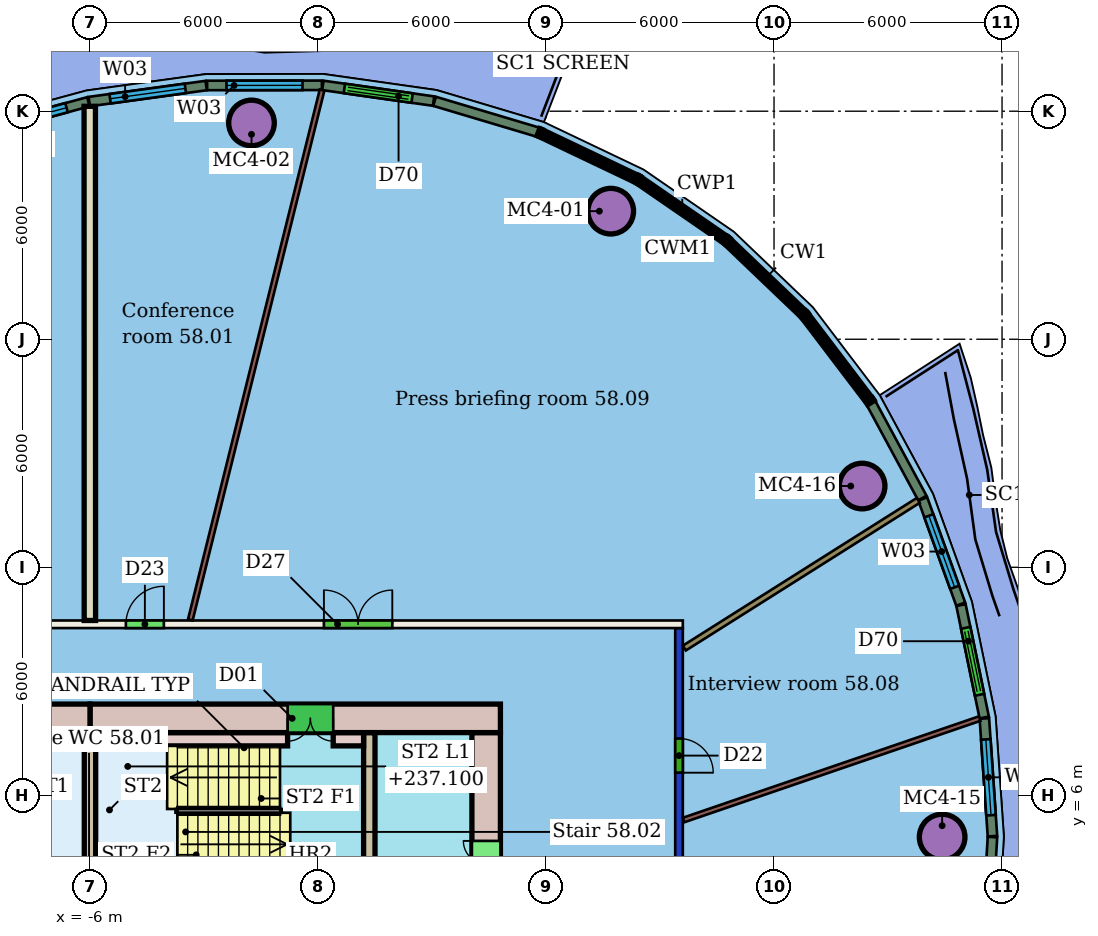
"""IFC4 building model, lengths in metres.
Left out: names, types, materials, properties, quantities, classifications, styles, units other than length and angle.
Written with IfcOpenShell. Run it as: python <this file> out.ifc"""

import sys

from ifc_helpers import new_model, si_unit, direction, frame, frame_2d, origin, origin_2d, place, context, subcontext, project, spatial, rectangle, hollow_circle, extrude, element, fill, save


model = new_model("IFC4")
c1 = context("Model", 3, precision=1e-05, world=origin(), true_north=direction((0.0, 1.0)))
c2 = subcontext(c1, "Body", "Model", "MODEL_VIEW")
j1 = project(units=[si_unit("LENGTHUNIT", "METRE"), si_unit("PLANEANGLEUNIT", "RADIAN")], contexts=[c1])
p1 = place(None, origin())
s1 = spatial("IfcSite", under=j1, at=p1, CompositionType="ELEMENT")
p2 = place(p1, origin())
s2 = spatial("IfcBuilding", under=s1, at=p2, CompositionType="ELEMENT")
p3 = place(p2, frame((0.0, 0.0, 235.3)))
s3 = spatial("IfcBuildingStorey", under=s2, at=p3, CompositionType="ELEMENT", Elevation=235.3)
for number, where, z_axis, x_axis in (
    (1, (7.704, 21.37, 0.0), (0.0, 0.0, 1.0), (1.0, 0.0, 0.0)),
    (2, (-1.75, 23.691, 0.0), (0.0, 0.0, 1.0), (1.0, 0.0, 0.0)),
    (3, (16.424, 4.901, 0.0), (0.0, 0.0, 1.0), (1.0, 0.0, 0.0)),
    (4, (14.318, 14.137, 0.0), (0.0, 0.0, 1.0), (1.0, 0.0, 0.0)),
):
    element("IfcColumn", number, at=place(p3, frame(where, z_axis=z_axis, x_axis=x_axis)), inside=s3, PredefinedType="COLUMN", context=c2, shape_type="SweptSolid", body=[
        extrude(hollow_circle(Radius=0.6, WallThickness=0.045, at=origin_2d()), origin(), (0.0, 0.0, 1.0), 3.45),
    ])
p4 = place(p3, frame((-21.6, 10.5, 0.0), z_axis=(0.0, 0.0, 1.0), x_axis=(1.0, 0.0, 0.0)))
e5 = element("IfcWall", 5, at=p4, inside=s3, PredefinedType="PARTITIONING", context=c2, shape_type="SweptSolid", body=[
    extrude(rectangle(XDim=31.2, YDim=0.2, at=frame_2d((15.6, 0.0))), origin(), (0.0, 0.0, 1.0), 3.45),
])
p5 = place(p4, frame((16.544, 0.0, 0.0)))
e6 = element("IfcOpeningElement", 6, at=p5, cuts=e5, PredefinedType="OPENING", context=c2, shape_type="SweptSolid", body=[
    extrude(rectangle(XDim=1.0, YDim=2.4, at=frame_2d((0.5, 1.2))), frame((0.0, 0.11, 0.0), z_axis=(0.0, -1.0, 0.0), x_axis=(1.0, 0.0, 0.0)), (0.0, 0.0, 1.0), 0.22),
])
p6 = place(p4, frame((10.228, 0.0, 0.0)))
e7 = element("IfcOpeningElement", 7, at=p6, cuts=e5, PredefinedType="OPENING", context=c2, shape_type="SweptSolid", body=[
    extrude(rectangle(XDim=1.8, YDim=2.4, at=frame_2d((0.9, 1.2))), frame((0.0, 0.11, 0.0), z_axis=(0.0, -1.0, 0.0), x_axis=(1.0, 0.0, 0.0)), (0.0, 0.0, 1.0), 0.22),
])
p7 = place(p4, frame((21.755, 0.0, 0.0)))
e8 = element("IfcOpeningElement", 8, at=p7, cuts=e5, PredefinedType="OPENING", context=c2, shape_type="SweptSolid", body=[
    extrude(rectangle(XDim=1.8, YDim=2.4, at=frame_2d((0.9, 1.2))), frame((0.0, 0.11, 0.0), z_axis=(0.0, -1.0, 0.0), x_axis=(1.0, 0.0, 0.0)), (0.0, 0.0, 1.0), 0.22),
])
p8 = place(p3, frame((9.5, 10.4, 0.0), z_axis=(0.0, 0.0, 1.0), x_axis=(0.0, -1.0, 0.0)))
e9 = element("IfcWall", 9, at=p8, inside=s3, PredefinedType="PARTITIONING", context=c2, shape_type="SweptSolid", body=[
    extrude(rectangle(XDim=20.8, YDim=0.2, at=frame_2d((10.4, 0.0))), origin(), (0.0, 0.0, 1.0), 3.05),
])
p9 = place(p8, frame((8.162, 0.0, 0.0)))
e10 = element("IfcOpeningElement", 10, at=p9, cuts=e9, PredefinedType="OPENING", context=c2, shape_type="SweptSolid", body=[
    extrude(rectangle(XDim=1.5, YDim=2.1, at=frame_2d((0.75, 1.05))), frame((0.0, 0.11, 0.0), z_axis=(0.0, -1.0, 0.0), x_axis=(1.0, 0.0, 0.0)), (0.0, 0.0, 1.0), 0.22),
])
p10 = place(p8, frame((2.906, 0.0, 0.0)))
e11 = element("IfcOpeningElement", 11, at=p10, cuts=e9, PredefinedType="OPENING", context=c2, shape_type="SweptSolid", body=[
    extrude(rectangle(XDim=0.9, YDim=2.1, at=frame_2d((0.45, 1.05))), frame((0.0, 0.11, 0.0), z_axis=(0.0, -1.0, 0.0), x_axis=(1.0, 0.0, 0.0)), (0.0, 0.0, 1.0), 0.22),
])
p11 = place(p3, frame((0.107, 24.557, 0.0), z_axis=(0.0, 0.0, 1.0), x_axis=(-0.241331862986, -0.970442647408, 0.0)))
e12 = element("IfcWall", 12, at=p11, inside=s3, PredefinedType="PARTITIONING", context=c2, shape_type="SweptSolid", body=[
    extrude(rectangle(XDim=14.366, YDim=0.125, at=frame_2d((7.183, 0.0))), origin(), (0.0, 0.0, 1.0), 3.45),
])
p12 = place(p3, frame((-6.006, 24.129, 0.0), z_axis=(0.0, 0.0, 1.0), x_axis=(0.000252643728, -0.999999968086, 0.0)))
e13 = element("IfcWall", 13, at=p12, inside=s3, PredefinedType="PARTITIONING", context=c2, shape_type="SweptSolid", body=[
    extrude(rectangle(XDim=13.529, YDim=0.3, at=frame_2d((6.764, 0.0))), origin(), (0.0, 0.0, 1.0), 3.45),
])
p13 = place(p3, frame((17.41, 8.018, 0.0), z_axis=(0.0, 0.0, 1.0), x_axis=(-0.94604778294, -0.32402714762, 0.0)))
e14 = element("IfcWall", 14, at=p13, inside=s3, PredefinedType="PARTITIONING", context=c2, shape_type="SweptSolid", body=[
    extrude(rectangle(XDim=8.234, YDim=0.125, at=frame_2d((4.117, 0.0))), origin(), (0.0, 0.0, 1.0), 3.45),
])
p14 = place(p3, frame((15.795, 13.759, 0.0), z_axis=(0.0, 0.0, 1.0), x_axis=(-0.845590904019, -0.533831455649, 0.0)))
e15 = element("IfcWall", 15, at=p14, inside=s3, PredefinedType="PARTITIONING", context=c2, shape_type="SweptSolid", body=[
    extrude(rectangle(XDim=7.279, YDim=0.15, at=frame_2d((3.64, 0.0))), origin(), (0.0, 0.0, 1.0), 3.45),
])
p15 = place(p3, frame((5.785, 23.449, 0.0), z_axis=(0.0, 0.0, 1.0), x_axis=(-0.958235211518, 0.28598125709, 0.0)))
e16 = element("IfcWall", 16, at=p15, inside=s3, PredefinedType="SOLIDWALL", context=c2, shape_type="SweptSolid", body=[
    extrude(rectangle(XDim=2.836, YDim=0.25, at=frame_2d((1.418, 0.0))), origin(), (0.0, 0.0, 1.0), 3.1),
])
p16 = place(p3, frame((3.042, 24.266, 0.0), z_axis=(0.0, 0.0, 1.0), x_axis=(-0.990073564397, 0.140550123028, 0.0)))
e17 = element("IfcWall", 17, at=p16, inside=s3, PredefinedType="SOLIDWALL", context=c2, shape_type="SweptSolid", body=[
    extrude(rectangle(XDim=2.943, YDim=0.25, at=frame_2d((1.471, 0.0))), origin(), (0.0, 0.0, 1.0), 3.1),
])
p17 = place(p16, frame((0.571, 0.0, 0.0)))
e18 = element("IfcOpeningElement", 18, at=p17, cuts=e17, PredefinedType="OPENING", context=c2, shape_type="SweptSolid", body=[
    extrude(rectangle(XDim=1.8, YDim=2.4, at=frame_2d((0.9, 1.2))), frame((0.0, 0.135, 0.0), z_axis=(0.0, -1.0, 0.0), x_axis=(1.0, 0.0, 0.0)), (0.0, 0.0, 1.0), 0.27),
])
p18 = place(p3, frame((0.103, 24.681, 0.0), z_axis=(0.0, 0.0, 1.0), x_axis=(-0.999999163763, -0.001293241725, 0.0)))
e19 = element("IfcWall", 19, at=p18, inside=s3, PredefinedType="SOLIDWALL", context=c2, shape_type="SweptSolid", body=[
    extrude(rectangle(XDim=3.021, YDim=0.25, at=frame_2d((1.51, 0.0))), origin(), (0.0, 0.0, 1.0), 3.1),
])
p19 = place(p18, frame((0.51, 0.0, 0.9)))
e20 = element("IfcOpeningElement", 20, at=p19, cuts=e19, PredefinedType="OPENING", context=c2, shape_type="SweptSolid", body=[
    extrude(rectangle(XDim=2.0, YDim=2.1, at=frame_2d((1.0, 1.05))), frame((0.0, 0.135, 0.0), z_axis=(0.0, -1.0, 0.0), x_axis=(1.0, 0.0, 0.0)), (0.0, 0.0, 1.0), 0.27),
])
p20 = place(p3, frame((-2.943, 24.676, 0.0), z_axis=(0.0, 0.0, 1.0), x_axis=(-0.990694748904, -0.136102588123, 0.0)))
e21 = element("IfcWall", 21, at=p20, inside=s3, PredefinedType="SOLIDWALL", context=c2, shape_type="SweptSolid", body=[
    extrude(rectangle(XDim=3.105, YDim=0.25, at=frame_2d((1.552, 0.0))), origin(), (0.0, 0.0, 1.0), 3.1),
])
p21 = place(p20, frame((0.553, 0.0, 0.9)))
e22 = element("IfcOpeningElement", 22, at=p21, cuts=e21, PredefinedType="OPENING", context=c2, shape_type="SweptSolid", body=[
    extrude(rectangle(XDim=2.0, YDim=2.1, at=frame_2d((1.0, 1.05))), frame((0.0, 0.135, 0.0), z_axis=(0.0, -1.0, 0.0), x_axis=(1.0, 0.0, 0.0)), (0.0, 0.0, 1.0), 0.27),
])
p22 = place(p3, frame((-6.043, 24.248, 0.0), z_axis=(0.0, 0.0, 1.0), x_axis=(-0.965105590166, -0.261861031522, 0.0)))
e23 = element("IfcWall", 23, at=p22, inside=s3, PredefinedType="SOLIDWALL", context=c2, shape_type="SweptSolid", body=[
    extrude(rectangle(XDim=3.19, YDim=0.25, at=frame_2d((1.595, 0.0))), origin(), (0.0, 0.0, 1.0), 3.1),
])
p23 = place(p22, frame((0.595, 0.0, 0.9)))
e24 = element("IfcOpeningElement", 24, at=p23, cuts=e23, PredefinedType="OPENING", context=c2, shape_type="SweptSolid", body=[
    extrude(rectangle(XDim=2.0, YDim=2.1, at=frame_2d((1.0, 1.05))), frame((0.0, 0.135, 0.0), z_axis=(0.0, -1.0, 0.0), x_axis=(1.0, 0.0, 0.0)), (0.0, 0.0, 1.0), 0.27),
])
p24 = place(p3, frame((17.558, 1.716, 0.0), z_axis=(0.0, 0.0, 1.0), x_axis=(0.059610174745, 0.998221732416, 0.0)))
e25 = element("IfcWall", 25, at=p24, inside=s3, PredefinedType="SOLIDWALL", context=c2, shape_type="SweptSolid", body=[
    extrude(rectangle(XDim=3.19, YDim=0.25, at=frame_2d((1.595, 0.0))), origin(), (0.0, 0.0, 1.0), 3.1),
])
p25 = place(p24, frame((0.595, 0.0, 0.9)))
e26 = element("IfcOpeningElement", 26, at=p25, cuts=e25, PredefinedType="OPENING", context=c2, shape_type="SweptSolid", body=[
    extrude(rectangle(XDim=2.0, YDim=2.1, at=frame_2d((1.0, 1.05))), frame((0.0, 0.135, 0.0), z_axis=(0.0, -1.0, 0.0), x_axis=(1.0, 0.0, 0.0)), (0.0, 0.0, 1.0), 0.27),
])
p26 = place(p3, frame((17.748, 4.924, 0.0), z_axis=(0.0, 0.0, 1.0), x_axis=(-0.068637495047, 0.997641666268, 0.0)))
e27 = element("IfcWall", 27, at=p26, inside=s3, PredefinedType="SOLIDWALL", context=c2, shape_type="SweptSolid", body=[
    extrude(rectangle(XDim=3.105, YDim=0.25, at=frame_2d((1.553, 0.0))), origin(), (0.0, 0.0, 1.0), 3.1),
])
p27 = place(p26, frame((0.553, 0.0, 0.9)))
e28 = element("IfcOpeningElement", 28, at=p27, cuts=e27, PredefinedType="OPENING", context=c2, shape_type="SweptSolid", body=[
    extrude(rectangle(XDim=2.0, YDim=2.1, at=frame_2d((1.0, 1.05))), frame((0.0, 0.135, 0.0), z_axis=(0.0, -1.0, 0.0), x_axis=(1.0, 0.0, 0.0)), (0.0, 0.0, 1.0), 0.27),
])
p28 = place(p3, frame((17.531, 8.047, 0.0), z_axis=(0.0, 0.0, 1.0), x_axis=(-0.202546805283, 0.979272582925, 0.0)))
e29 = element("IfcWall", 29, at=p28, inside=s3, PredefinedType="SOLIDWALL", context=c2, shape_type="SweptSolid", body=[
    extrude(rectangle(XDim=3.021, YDim=0.25, at=frame_2d((1.51, 0.0))), origin(), (0.0, 0.0, 1.0), 3.1),
])
p29 = place(p28, frame((0.61, 0.0, 0.0)))
e30 = element("IfcOpeningElement", 30, at=p29, cuts=e29, PredefinedType="OPENING", context=c2, shape_type="SweptSolid", body=[
    extrude(rectangle(XDim=1.8, YDim=2.4, at=frame_2d((0.9, 1.2))), frame((0.0, 0.135, 0.0), z_axis=(0.0, -1.0, 0.0), x_axis=(1.0, 0.0, 0.0)), (0.0, 0.0, 1.0), 0.27),
])
p30 = place(p3, frame((16.913, 11.03, 0.0), z_axis=(0.0, 0.0, 1.0), x_axis=(-0.339430375323, 0.940631181871, 0.0)))
e31 = element("IfcWall", 31, at=p30, inside=s3, PredefinedType="SOLIDWALL", context=c2, shape_type="SweptSolid", body=[
    extrude(rectangle(XDim=2.943, YDim=0.25, at=frame_2d((1.471, 0.0))), origin(), (0.0, 0.0, 1.0), 3.1),
])
p31 = place(p30, frame((0.471, 0.0, 0.9)))
e32 = element("IfcOpeningElement", 32, at=p31, cuts=e31, PredefinedType="OPENING", context=c2, shape_type="SweptSolid", body=[
    extrude(rectangle(XDim=2.0, YDim=2.1, at=frame_2d((1.0, 1.05))), frame((0.0, 0.135, 0.0), z_axis=(0.0, -1.0, 0.0), x_axis=(1.0, 0.0, 0.0)), (0.0, 0.0, 1.0), 0.27),
])
p32 = place(p3, frame((15.903, 13.822, 0.0), z_axis=(0.0, 0.0, 1.0), x_axis=(-0.475295544149, 0.879826201992, 0.0)))
e33 = element("IfcWall", 33, at=p32, inside=s3, PredefinedType="SOLIDWALL", context=c2, shape_type="SweptSolid", body=[
    extrude(rectangle(XDim=2.836, YDim=0.25, at=frame_2d((1.418, 0.0))), origin(), (0.0, 0.0, 1.0), 3.1),
])
p33 = place(p3, frame((4.8, 8.025, 0.0), z_axis=(0.0, 0.0, 1.0), x_axis=(-1.0, 0.0, 0.0)))
e34 = element("IfcWall", 34, at=p33, inside=s3, PredefinedType="SHEAR", context=c2, shape_type="SweptSolid", body=[
    extrude(rectangle(XDim=10.8, YDim=0.75, at=frame_2d((5.4, 0.0))), origin(), (0.0, 0.0, 1.0), 3.3),
])
p34 = place(p33, frame((4.4, 0.0, 0.0)))
e35 = element("IfcOpeningElement", 35, at=p34, cuts=e34, PredefinedType="OPENING", context=c2, shape_type="SweptSolid", body=[
    extrude(rectangle(XDim=1.2, YDim=2.1, at=frame_2d((0.6, 1.05))), frame((0.0, 0.385, 0.0), z_axis=(0.0, -1.0, 0.0), x_axis=(1.0, 0.0, 0.0)), (0.0, 0.0, 1.0), 0.77),
])
p35 = place(p3, frame((-6.0, 8.025, 0.0), z_axis=(0.0, 0.0, 1.0), x_axis=(-1.0, 0.0, 0.0)))
e36 = element("IfcWall", 36, at=p35, inside=s3, PredefinedType="SHEAR", context=c2, shape_type="SweptSolid", body=[
    extrude(rectangle(XDim=10.8, YDim=0.75, at=frame_2d((5.4, 0.0))), origin(), (0.0, 0.0, 1.0), 3.3),
])
p36 = place(p35, frame((5.2, 0.0, 0.0)))
e37 = element("IfcOpeningElement", 37, at=p36, cuts=e36, PredefinedType="OPENING", context=c2, shape_type="SweptSolid", body=[
    extrude(rectangle(XDim=1.2, YDim=2.1, at=frame_2d((0.6, 1.05))), frame((0.0, 0.385, 0.0), z_axis=(0.0, -1.0, 0.0), x_axis=(1.0, 0.0, 0.0)), (0.0, 0.0, 1.0), 0.77),
])
p37 = place(p3, frame((4.425, -7.65, 0.0), z_axis=(0.0, 0.0, 1.0), x_axis=(0.0, 1.0, 0.0)))
e38 = element("IfcWall", 38, at=p37, inside=s3, PredefinedType="SHEAR", context=c2, shape_type="SweptSolid", body=[
    extrude(rectangle(XDim=15.3, YDim=0.75, at=frame_2d((7.65, 0.0))), origin(), (0.0, 0.0, 1.0), 3.3),
])
p38 = place(p37, frame((2.85, 0.0, 0.0)))
e39 = element("IfcOpeningElement", 39, at=p38, cuts=e38, PredefinedType="OPENING", context=c2, shape_type="SweptSolid", body=[
    extrude(rectangle(XDim=1.2, YDim=2.1, at=frame_2d((0.6, 1.05))), frame((0.0, 0.385, 0.0), z_axis=(0.0, -1.0, 0.0), x_axis=(1.0, 0.0, 0.0)), (0.0, 0.0, 1.0), 0.77),
])
p39 = place(p37, frame((11.25, 0.0, 0.0)))
e40 = element("IfcOpeningElement", 40, at=p39, cuts=e38, PredefinedType="OPENING", context=c2, shape_type="SweptSolid", body=[
    extrude(rectangle(XDim=1.2, YDim=2.1, at=frame_2d((0.6, 1.05))), frame((0.0, 0.385, 0.0), z_axis=(0.0, -1.0, 0.0), x_axis=(1.0, 0.0, 0.0)), (0.0, 0.0, 1.0), 0.77),
])
p40 = place(p3, frame((1.35, -7.65, 0.0), z_axis=(0.0, 0.0, 1.0), x_axis=(0.0, 1.0, 0.0)))
e41 = element("IfcWall", 41, at=p40, inside=s3, PredefinedType="SHEAR", context=c2, shape_type="SweptSolid", body=[
    extrude(rectangle(XDim=15.3, YDim=0.3, at=frame_2d((7.65, 0.0))), origin(), (0.0, 0.0, 1.0), 3.3),
])
p41 = place(p40, frame((1.56, 0.0, 0.0)))
e42 = element("IfcOpeningElement", 42, at=p41, cuts=e41, PredefinedType="OPENING", context=c2, shape_type="SweptSolid", body=[
    extrude(rectangle(XDim=1.0, YDim=2.1, at=frame_2d((0.5, 1.05))), frame((0.0, 0.16, 0.0), z_axis=(0.0, -1.0, 0.0), x_axis=(1.0, 0.0, 0.0)), (0.0, 0.0, 1.0), 0.32),
])
p42 = place(p40, frame((6.9, 0.0, 0.0)))
e43 = element("IfcOpeningElement", 43, at=p42, cuts=e41, PredefinedType="OPENING", context=c2, shape_type="SweptSolid", body=[
    extrude(rectangle(XDim=1.5, YDim=2.1, at=frame_2d((0.75, 1.05))), frame((0.0, 0.16, 0.0), z_axis=(0.0, -1.0, 0.0), x_axis=(1.0, 0.0, 0.0)), (0.0, 0.0, 1.0), 0.32),
])
p43 = place(p3, frame((-6.0, 3.88, 0.0), z_axis=(0.0, 0.0, 1.0), x_axis=(0.0, 1.0, 0.0)))
e44 = element("IfcWall", 44, at=p43, inside=s3, PredefinedType="SHEAR", context=c2, shape_type="SweptSolid", body=[
    extrude(rectangle(XDim=3.77, YDim=0.3, at=frame_2d((1.885, 0.0))), origin(), (0.0, 0.0, 1.0), 3.3),
])
for number, where, z_axis, x_axis in (
    (45, (-11.2, 7.475, 0.0), (0.0, 0.0, 1.0), (1.0, 0.0, 0.0)),
    (46, (-5.85, 7.475, 0.0), (0.0, 0.0, 1.0), (1.0, 0.0, 0.0)),
):
    element("IfcWall", number, at=place(p3, frame(where, z_axis=z_axis, x_axis=x_axis)), inside=s3, PredefinedType="SHEAR", context=c2, shape_type="SweptSolid", body=[
        extrude(rectangle(XDim=5.05, YDim=0.35, at=frame_2d((2.525, 0.0))), origin(), (0.0, 0.0, 1.0), 3.3),
    ])
p44 = place(p3, frame((0.4, 7.475, 0.0), z_axis=(0.0, 0.0, 1.0), x_axis=(1.0, 0.0, 0.0)))
e47 = element("IfcWall", 47, at=p44, inside=s3, PredefinedType="SHEAR", context=c2, shape_type="SweptSolid", body=[
    extrude(rectangle(XDim=0.8, YDim=0.35, at=frame_2d((0.4, 0.0))), origin(), (0.0, 0.0, 1.0), 3.3),
])
p45 = place(p5, origin())
e48 = element("IfcDoor", 48, at=p45, inside=s3, OperationType="SINGLE_SWING_RIGHT", PredefinedType="DOOR", context=c2, shape_type="SweptSolid", body=[
    extrude(rectangle(XDim=1.0, YDim=2.4, at=frame_2d((0.5, 1.2))), frame((0.0, 0.025, 0.0), z_axis=(0.0, -1.0, 0.0), x_axis=(1.0, 0.0, 0.0)), (0.0, 0.0, 1.0), 0.05),
])
fill(e6, e48)
p46 = place(p10, origin())
e49 = element("IfcDoor", 49, at=p46, inside=s3, OperationType="SINGLE_SWING_RIGHT", PredefinedType="DOOR", context=c2, shape_type="SweptSolid", body=[
    extrude(rectangle(XDim=0.9, YDim=2.1, at=frame_2d((0.45, 1.05))), frame((0.0, 0.025, 0.0), z_axis=(0.0, -1.0, 0.0), x_axis=(1.0, 0.0, 0.0)), (0.0, 0.0, 1.0), 0.05),
])
fill(e11, e49)
p47 = place(p7, origin())
e50 = element("IfcDoor", 50, at=p47, inside=s3, OperationType="DOUBLE_DOOR_SINGLE_SWING", PredefinedType="DOOR", context=c2, shape_type="SweptSolid", body=[
    extrude(rectangle(XDim=1.8, YDim=2.4, at=frame_2d((0.9, 1.2))), frame((0.0, 0.025, 0.0), z_axis=(0.0, -1.0, 0.0), x_axis=(1.0, 0.0, 0.0)), (0.0, 0.0, 1.0), 0.05),
])
fill(e8, e50)
p48 = place(p17, origin())
e51 = element("IfcDoor", 51, at=p48, inside=s3, OperationType="DOUBLE_DOOR_SLIDING", PredefinedType="DOOR", context=c2, shape_type="SweptSolid", body=[
    extrude(rectangle(XDim=1.8, YDim=2.4, at=frame_2d((0.9, 1.2))), frame((0.0, 0.025, 0.0), z_axis=(0.0, -1.0, 0.0), x_axis=(1.0, 0.0, 0.0)), (0.0, 0.0, 1.0), 0.05),
])
fill(e18, e51)
p49 = place(p19, origin())
e52 = element("IfcWindow", 52, at=p49, inside=s3, PartitioningType="SINGLE_PANEL", PredefinedType="WINDOW", context=c2, shape_type="SweptSolid", body=[
    extrude(rectangle(XDim=2.0, YDim=2.1, at=frame_2d((1.0, 1.05))), frame((0.0, 0.03, 0.0), z_axis=(0.0, -1.0, 0.0), x_axis=(1.0, 0.0, 0.0)), (0.0, 0.0, 1.0), 0.06),
])
fill(e20, e52)
p50 = place(p21, origin())
e53 = element("IfcWindow", 53, at=p50, inside=s3, PartitioningType="SINGLE_PANEL", PredefinedType="WINDOW", context=c2, shape_type="SweptSolid", body=[
    extrude(rectangle(XDim=2.0, YDim=2.1, at=frame_2d((1.0, 1.05))), frame((0.0, 0.03, 0.0), z_axis=(0.0, -1.0, 0.0), x_axis=(1.0, 0.0, 0.0)), (0.0, 0.0, 1.0), 0.06),
])
fill(e22, e53)
p51 = place(p23, origin())
e54 = element("IfcWindow", 54, at=p51, inside=s3, PartitioningType="SINGLE_PANEL", PredefinedType="WINDOW", context=c2, shape_type="SweptSolid", body=[
    extrude(rectangle(XDim=2.0, YDim=2.1, at=frame_2d((1.0, 1.05))), frame((0.0, 0.03, 0.0), z_axis=(0.0, -1.0, 0.0), x_axis=(1.0, 0.0, 0.0)), (0.0, 0.0, 1.0), 0.06),
])
fill(e24, e54)
p52 = place(p27, origin())
e55 = element("IfcWindow", 55, at=p52, inside=s3, PartitioningType="SINGLE_PANEL", PredefinedType="WINDOW", context=c2, shape_type="SweptSolid", body=[
    extrude(rectangle(XDim=2.0, YDim=2.1, at=frame_2d((1.0, 1.05))), frame((0.0, 0.03, 0.0), z_axis=(0.0, -1.0, 0.0), x_axis=(1.0, 0.0, 0.0)), (0.0, 0.0, 1.0), 0.06),
])
fill(e28, e55)
p53 = place(p29, origin())
e56 = element("IfcDoor", 56, at=p53, inside=s3, OperationType="DOUBLE_DOOR_SLIDING", PredefinedType="DOOR", context=c2, shape_type="SweptSolid", body=[
    extrude(rectangle(XDim=1.8, YDim=2.4, at=frame_2d((0.9, 1.2))), frame((0.0, 0.025, 0.0), z_axis=(0.0, -1.0, 0.0), x_axis=(1.0, 0.0, 0.0)), (0.0, 0.0, 1.0), 0.05),
])
fill(e30, e56)
p54 = place(p31, origin())
e57 = element("IfcWindow", 57, at=p54, inside=s3, PartitioningType="SINGLE_PANEL", PredefinedType="WINDOW", context=c2, shape_type="SweptSolid", body=[
    extrude(rectangle(XDim=2.0, YDim=2.1, at=frame_2d((1.0, 1.05))), frame((0.0, 0.03, 0.0), z_axis=(0.0, -1.0, 0.0), x_axis=(1.0, 0.0, 0.0)), (0.0, 0.0, 1.0), 0.06),
])
fill(e32, e57)
p55 = place(p34, origin())
e58 = element("IfcDoor", 58, at=p55, inside=s3, OperationType="DOUBLE_DOOR_SINGLE_SWING", PredefinedType="NOTDEFINED", context=c2, shape_type="SweptSolid", body=[
    extrude(rectangle(XDim=1.2, YDim=2.1, at=frame_2d((0.6, 1.05))), frame((0.0, 0.025, 0.0), z_axis=(0.0, -1.0, 0.0), x_axis=(1.0, 0.0, 0.0)), (0.0, 0.0, 1.0), 0.05),
])
fill(e35, e58)
p56 = place(p39, origin())
e59 = element("IfcDoor", 59, at=p56, inside=s3, OperationType="DOUBLE_DOOR_SINGLE_SWING", PredefinedType="NOTDEFINED", context=c2, shape_type="SweptSolid", body=[
    extrude(rectangle(XDim=1.2, YDim=2.1, at=frame_2d((0.6, 1.05))), frame((0.0, 0.025, 0.0), z_axis=(0.0, -1.0, 0.0), x_axis=(1.0, 0.0, 0.0)), (0.0, 0.0, 1.0), 0.05),
])
fill(e40, e59)
save(model, sys.argv[1])
